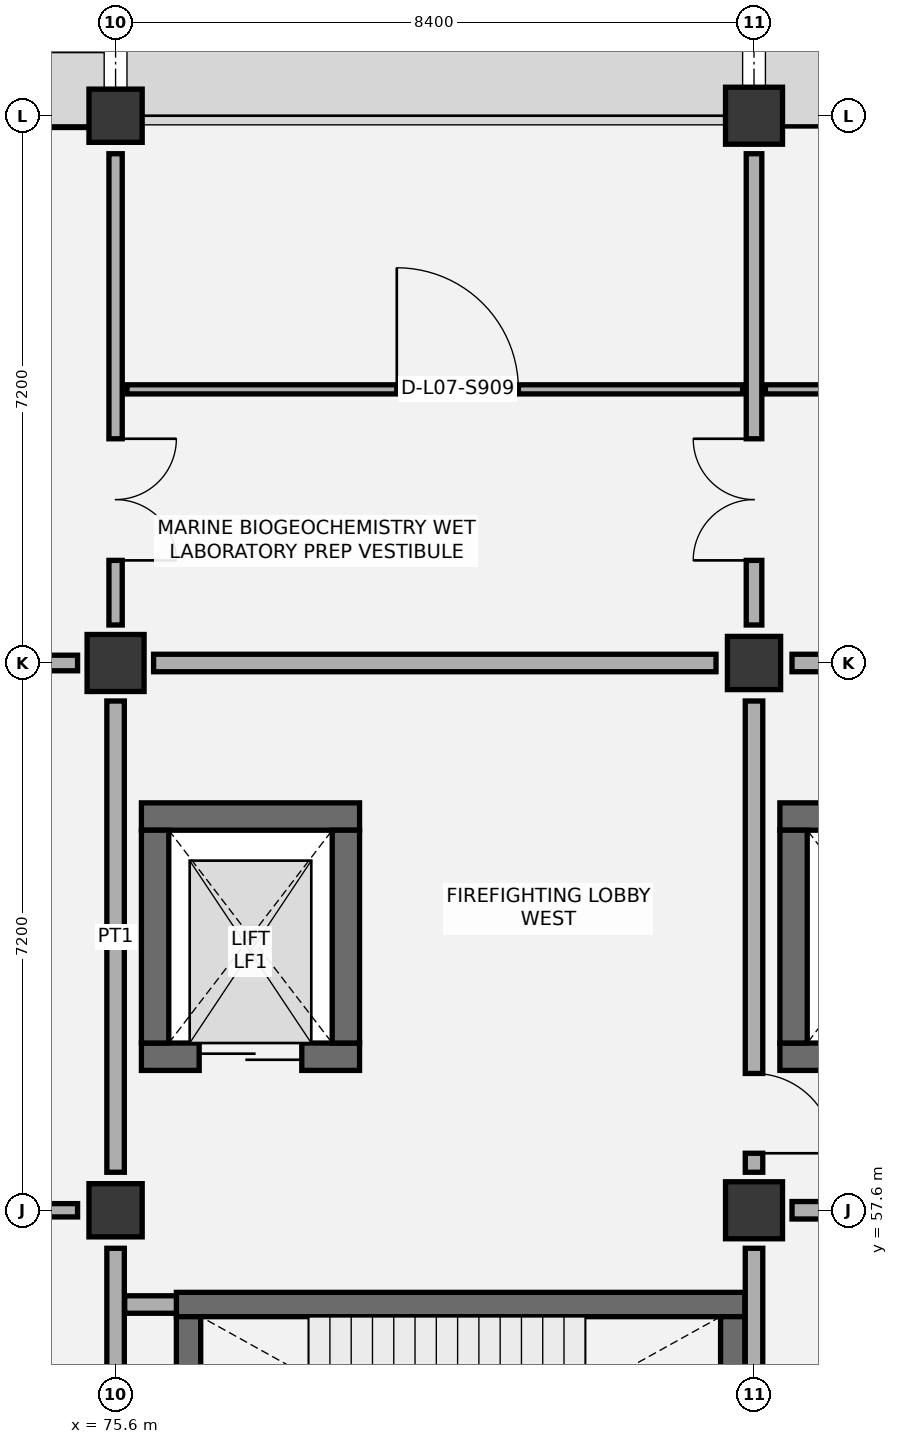
"""IFC4 building model, lengths in metres.
Left out: names, types, materials, properties, quantities, classifications, styles, units other than length and angle.
Written with IfcOpenShell. Run it as: python <this file> out.ifc"""

import sys

from ifc_helpers import new_model, si_unit, direction, frame, frame_2d, origin, origin_2d, place, context, subcontext, project, spatial, rectangle, extrude, element, fill, save


model = new_model("IFC4")
c1 = context("Model", 3, precision=1e-05, world=origin(), true_north=direction((0.0, 1.0)))
c2 = subcontext(c1, "Body", "Model", "MODEL_VIEW")
j1 = project(units=[si_unit("LENGTHUNIT", "METRE"), si_unit("PLANEANGLEUNIT", "RADIAN")], contexts=[c1])
p1 = place(None, origin())
s1 = spatial("IfcSite", under=j1, at=p1, CompositionType="ELEMENT")
p2 = place(p1, origin())
s2 = spatial("IfcBuilding", under=s1, at=p2, CompositionType="ELEMENT")
p3 = place(p2, frame((0.0, 0.0, 35.4)))
s3 = spatial("IfcBuildingStorey", under=s2, at=p3, CompositionType="ELEMENT", Elevation=35.4)
p4 = place(p3, frame((75.6, 57.6, 0.0), z_axis=(0.0, 0.0, 1.0), x_axis=(1.0, 0.0, 0.0)))
e1 = element("IfcColumn", 1, at=p4, inside=s3, PredefinedType="COLUMN", context=c2, shape_type="SweptSolid", body=[
    extrude(rectangle(XDim=0.7, YDim=0.7, at=origin_2d()), origin(), (0.0, 0.0, 1.0), 4.2),
])
p5 = place(p3, frame((75.6, 64.8, 0.0), z_axis=(0.0, 0.0, 1.0), x_axis=(1.0, 0.0, 0.0)))
e2 = element("IfcColumn", 2, at=p5, inside=s3, PredefinedType="COLUMN", context=c2, shape_type="SweptSolid", body=[
    extrude(rectangle(XDim=0.75, YDim=0.75, at=origin_2d()), origin(), (0.0, 0.0, 1.0), 4.2),
])
p6 = place(p3, frame((75.6, 72.0, 0.0), z_axis=(0.0, 0.0, 1.0), x_axis=(1.0, 0.0, 0.0)))
e3 = element("IfcColumn", 3, at=p6, inside=s3, PredefinedType="COLUMN", context=c2, shape_type="SweptSolid", body=[
    extrude(rectangle(XDim=0.7, YDim=0.7, at=origin_2d()), origin(), (0.0, 0.0, 1.0), 4.2),
])
p7 = place(p3, frame((84.0, 57.6, 0.0), z_axis=(0.0, 0.0, 1.0), x_axis=(1.0, 0.0, 0.0)))
e4 = element("IfcColumn", 4, at=p7, inside=s3, PredefinedType="COLUMN", context=c2, shape_type="SweptSolid", body=[
    extrude(rectangle(XDim=0.75, YDim=0.75, at=origin_2d()), origin(), (0.0, 0.0, 1.0), 4.2),
])
p8 = place(p3, frame((84.0, 64.8, 0.0), z_axis=(0.0, 0.0, 1.0), x_axis=(1.0, 0.0, 0.0)))
e5 = element("IfcColumn", 5, at=p8, inside=s3, PredefinedType="COLUMN", context=c2, shape_type="SweptSolid", body=[
    extrude(rectangle(XDim=0.7, YDim=0.7, at=origin_2d()), origin(), (0.0, 0.0, 1.0), 4.2),
])
p9 = place(p3, frame((84.0, 72.0, 0.0), z_axis=(0.0, 0.0, 1.0), x_axis=(1.0, 0.0, 0.0)))
e6 = element("IfcColumn", 6, at=p9, inside=s3, PredefinedType="COLUMN", context=c2, shape_type="SweptSolid", body=[
    extrude(rectangle(XDim=0.75, YDim=0.75, at=origin_2d()), origin(), (0.0, 0.0, 1.0), 4.2),
])
p10 = place(p3, frame((76.4, 56.36, 0.0), z_axis=(0.0, 0.0, 1.0), x_axis=(1.0, 0.0, 0.0)))
e7 = element("IfcWall", 7, at=p10, inside=s3, PredefinedType="SHEAR", context=c2, shape_type="SweptSolid", body=[
    extrude(rectangle(XDim=7.48, YDim=0.32, at=frame_2d((3.74, 0.0))), origin(), (0.0, 0.0, 1.0), 3.92),
])
for number, where, z_axis, x_axis in (
    (8, (76.56, 52.4, 0.0), (0.0, 0.0, 1.0), (0.0, 1.0, 0.0)),
    (9, (83.72, 52.4, 0.0), (0.0, 0.0, 1.0), (0.0, 1.0, 0.0)),
):
    element("IfcWall", number, at=place(p3, frame(where, z_axis=z_axis, x_axis=x_axis)), inside=s3, PredefinedType="SHEAR", context=c2, shape_type="SweptSolid", body=[
        extrude(rectangle(XDim=3.8, YDim=0.32, at=frame_2d((1.9, 0.0))), origin(), (0.0, 0.0, 1.0), 3.92),
    ])
p11 = place(p3, frame((75.94, 62.78, 0.0), z_axis=(0.0, 0.0, 1.0), x_axis=(1.0, 0.0, 0.0)))
e10 = element("IfcWall", 10, at=p11, inside=s3, PredefinedType="SHEAR", context=c2, shape_type="SweptSolid", body=[
    extrude(rectangle(XDim=2.87, YDim=0.36, at=frame_2d((1.435, 0.0))), origin(), (0.0, 0.0, 1.0), 3.92),
])
p12 = place(p3, frame((75.94, 59.62, 0.0), z_axis=(0.0, 0.0, 1.0), x_axis=(1.0, 0.0, 0.0)))
e11 = element("IfcWall", 11, at=p12, inside=s3, PredefinedType="SHEAR", context=c2, shape_type="SweptSolid", body=[
    extrude(rectangle(XDim=2.87, YDim=0.36, at=frame_2d((1.435, 0.0))), origin(), (0.0, 0.0, 1.0), 3.92),
])
p13 = place(p12, frame((0.76, 0.0, 0.0)))
e12 = element("IfcOpeningElement", 12, at=p13, cuts=e11, PredefinedType="OPENING", context=c2, shape_type="SweptSolid", body=[
    extrude(rectangle(XDim=1.35, YDim=2.2, at=frame_2d((0.675, 1.1))), frame((0.0, 0.19, 0.0), z_axis=(0.0, -1.0, 0.0), x_axis=(1.0, 0.0, 0.0)), (0.0, 0.0, 1.0), 0.38),
])
for number, where, z_axis, x_axis in (
    (13, (76.12, 59.8, 0.0), (0.0, 0.0, 1.0), (0.0, 1.0, 0.0)),
    (14, (78.63, 59.8, 0.0), (0.0, 0.0, 1.0), (0.0, 1.0, 0.0)),
):
    element("IfcWall", number, at=place(p3, frame(where, z_axis=z_axis, x_axis=x_axis)), inside=s3, PredefinedType="SHEAR", context=c2, shape_type="SweptSolid", body=[
        extrude(rectangle(XDim=2.8, YDim=0.36, at=frame_2d((1.4, 0.0))), origin(), (0.0, 0.0, 1.0), 3.92),
    ])
p14 = place(p3, frame((84.34, 62.78, 0.0), z_axis=(0.0, 0.0, 1.0), x_axis=(1.0, 0.0, 0.0)))
e15 = element("IfcWall", 15, at=p14, inside=s3, PredefinedType="SHEAR", context=c2, shape_type="SweptSolid", body=[
    extrude(rectangle(XDim=7.77, YDim=0.36, at=frame_2d((3.885, 0.0))), origin(), (0.0, 0.0, 1.0), 3.92),
])
p15 = place(p3, frame((84.34, 59.62, 0.0), z_axis=(0.0, 0.0, 1.0), x_axis=(1.0, 0.0, 0.0)))
e16 = element("IfcWall", 16, at=p15, inside=s3, PredefinedType="SHEAR", context=c2, shape_type="SweptSolid", body=[
    extrude(rectangle(XDim=2.66, YDim=0.36, at=frame_2d((1.33, 0.0))), origin(), (0.0, 0.0, 1.0), 3.92),
])
p16 = place(p15, frame((0.78, 0.0, 0.0)))
e17 = element("IfcOpeningElement", 17, at=p16, cuts=e16, PredefinedType="OPENING", context=c2, shape_type="SweptSolid", body=[
    extrude(rectangle(XDim=1.1, YDim=2.15, at=frame_2d((0.55, 1.075))), frame((0.0, 0.19, 0.0), z_axis=(0.0, -1.0, 0.0), x_axis=(1.0, 0.0, 0.0)), (0.0, 0.0, 1.0), 0.38),
])
p17 = place(p3, frame((84.52, 59.8, 0.0), z_axis=(0.0, 0.0, 1.0), x_axis=(0.0, 1.0, 0.0)))
e18 = element("IfcWall", 18, at=p17, inside=s3, PredefinedType="SHEAR", context=c2, shape_type="SweptSolid", body=[
    extrude(rectangle(XDim=2.8, YDim=0.36, at=frame_2d((1.4, 0.0))), origin(), (0.0, 0.0, 1.0), 3.92),
])
p18 = place(p3, frame((67.575, 72.0, 0.0), z_axis=(0.0, 0.0, 1.0), x_axis=(1.0, 0.0, 0.0)))
e19 = element("IfcWall", 19, at=p18, inside=s3, PredefinedType="SOLIDWALL", context=c2, shape_type="SweptSolid", body=[
    extrude(rectangle(XDim=7.675, YDim=0.31, at=frame_2d((3.837, 0.0))), origin(), (0.0, 0.0, 1.0), 3.365),
])
p19 = place(p18, frame((1.058, 0.0, 0.9)))
e20 = element("IfcOpeningElement", 20, at=p19, cuts=e19, PredefinedType="OPENING", context=c2, shape_type="SweptSolid", body=[
    extrude(rectangle(XDim=2.25, YDim=1.95, at=frame_2d((1.125, 0.975))), frame((0.0, 0.165, 0.0), z_axis=(0.0, -1.0, 0.0), x_axis=(1.0, 0.0, 0.0)), (0.0, 0.0, 1.0), 0.33),
])
p20 = place(p18, frame((4.367, 0.0, 0.9)))
e21 = element("IfcOpeningElement", 21, at=p20, cuts=e19, PredefinedType="OPENING", context=c2, shape_type="SweptSolid", body=[
    extrude(rectangle(XDim=2.25, YDim=1.95, at=frame_2d((1.125, 0.975))), frame((0.0, 0.165, 0.0), z_axis=(0.0, -1.0, 0.0), x_axis=(1.0, 0.0, 0.0)), (0.0, 0.0, 1.0), 0.33),
])
p21 = place(p3, frame((84.375, 72.0, 0.0), z_axis=(0.0, 0.0, 1.0), x_axis=(1.0, 0.0, 0.0)))
e22 = element("IfcWall", 22, at=p21, inside=s3, PredefinedType="SOLIDWALL", context=c2, shape_type="SweptSolid", body=[
    extrude(rectangle(XDim=7.675, YDim=0.27, at=frame_2d((3.837, 0.0))), origin(), (0.0, 0.0, 1.0), 3.365),
])
p22 = place(p21, frame((1.758, 0.0, 0.9)))
e23 = element("IfcOpeningElement", 23, at=p22, cuts=e22, PredefinedType="OPENING", context=c2, shape_type="SweptSolid", body=[
    extrude(rectangle(XDim=1.2, YDim=1.8, at=frame_2d((0.6, 0.9))), frame((0.0, 0.145, 0.0), z_axis=(0.0, -1.0, 0.0), x_axis=(1.0, 0.0, 0.0)), (0.0, 0.0, 1.0), 0.29),
])
p23 = place(p21, frame((4.717, 0.0, 0.9)))
e24 = element("IfcOpeningElement", 24, at=p23, cuts=e22, PredefinedType="OPENING", context=c2, shape_type="SweptSolid", body=[
    extrude(rectangle(XDim=1.2, YDim=1.8, at=frame_2d((0.6, 0.9))), frame((0.0, 0.145, 0.0), z_axis=(0.0, -1.0, 0.0), x_axis=(1.0, 0.0, 0.0)), (0.0, 0.0, 1.0), 0.29),
])
p24 = place(p3, frame((75.75, 68.4, 0.0), z_axis=(0.0, 0.0, 1.0), x_axis=(1.0, 0.0, 0.0)))
e25 = element("IfcWall", 25, at=p24, inside=s3, PredefinedType="PARTITIONING", context=c2, shape_type="SweptSolid", body=[
    extrude(rectangle(XDim=8.1, YDim=0.12, at=frame_2d((4.05, 0.0))), origin(), (0.0, 0.0, 1.0), 3.92),
])
p25 = place(p24, frame((3.55, 0.0, 0.0)))
e26 = element("IfcOpeningElement", 26, at=p25, cuts=e25, PredefinedType="OPENING", context=c2, shape_type="SweptSolid", body=[
    extrude(rectangle(XDim=1.6, YDim=2.2, at=frame_2d((0.8, 1.1))), frame((0.0, 0.07, 0.0), z_axis=(0.0, -1.0, 0.0), x_axis=(1.0, 0.0, 0.0)), (0.0, 0.0, 1.0), 0.14),
])
p26 = place(p3, frame((84.15, 68.4, 0.0), z_axis=(0.0, 0.0, 1.0), x_axis=(1.0, 0.0, 0.0)))
e27 = element("IfcWall", 27, at=p26, inside=s3, PredefinedType="PARTITIONING", context=c2, shape_type="SweptSolid", body=[
    extrude(rectangle(XDim=8.1, YDim=0.12, at=frame_2d((4.05, 0.0))), origin(), (0.0, 0.0, 1.0), 3.92),
])
p27 = place(p26, frame((3.55, 0.0, 0.0)))
e28 = element("IfcOpeningElement", 28, at=p27, cuts=e27, PredefinedType="OPENING", context=c2, shape_type="SweptSolid", body=[
    extrude(rectangle(XDim=1.6, YDim=2.2, at=frame_2d((0.8, 1.1))), frame((0.0, 0.07, 0.0), z_axis=(0.0, -1.0, 0.0), x_axis=(1.0, 0.0, 0.0)), (0.0, 0.0, 1.0), 0.14),
])
p28 = place(p3, frame((75.6, 50.9, 0.0), z_axis=(0.0, 0.0, 1.0), x_axis=(0.0, 1.0, 0.0)))
e29 = element("IfcWall", 29, at=p28, inside=s3, PredefinedType="PARTITIONING", context=c2, shape_type="SweptSolid", body=[
    extrude(rectangle(XDim=6.2, YDim=0.23, at=frame_2d((3.1, 0.0))), origin(), (0.0, 0.0, 1.0), 3.315),
])
p29 = place(p28, frame((0.05, 0.0, 0.0)))
e30 = element("IfcOpeningElement", 30, at=p29, cuts=e29, PredefinedType="OPENING", context=c2, shape_type="SweptSolid", body=[
    extrude(rectangle(XDim=1.05, YDim=2.15, at=frame_2d((0.525, 1.075))), frame((0.0, 0.125, 0.0), z_axis=(0.0, -1.0, 0.0), x_axis=(1.0, 0.0, 0.0)), (0.0, 0.0, 1.0), 0.25),
])
p30 = place(p3, frame((67.7, 57.6, 0.0), z_axis=(0.0, 0.0, 1.0), x_axis=(1.0, 0.0, 0.0)))
e31 = element("IfcWall", 31, at=p30, inside=s3, PredefinedType="PARTITIONING", context=c2, shape_type="SweptSolid", body=[
    extrude(rectangle(XDim=7.4, YDim=0.175, at=frame_2d((3.7, 0.0))), origin(), (0.0, 0.0, 1.0), 3.265),
])
p31 = place(p30, frame((3.05, 0.0, 0.0)))
e32 = element("IfcOpeningElement", 32, at=p31, cuts=e31, PredefinedType="OPENING", context=c2, shape_type="SweptSolid", body=[
    extrude(rectangle(XDim=1.3, YDim=2.15, at=frame_2d((0.65, 1.075))), frame((0.0, 0.097, 0.0), z_axis=(0.0, -1.0, 0.0), x_axis=(1.0, 0.0, 0.0)), (0.0, 0.0, 1.0), 0.195),
])
p32 = place(p3, frame((75.6, 58.1, 0.0), z_axis=(0.0, 0.0, 1.0), x_axis=(0.0, 1.0, 0.0)))
e33 = element("IfcWall", 33, at=p32, inside=s3, PredefinedType="PARTITIONING", context=c2, shape_type="SweptSolid", body=[
    extrude(rectangle(XDim=6.2, YDim=0.23, at=frame_2d((3.1, 0.0))), origin(), (0.0, 0.0, 1.0), 3.515),
])
p33 = place(p3, frame((67.7, 64.8, 0.0), z_axis=(0.0, 0.0, 1.0), x_axis=(1.0, 0.0, 0.0)))
e34 = element("IfcWall", 34, at=p33, inside=s3, PredefinedType="PARTITIONING", context=c2, shape_type="SweptSolid", body=[
    extrude(rectangle(XDim=7.4, YDim=0.205, at=frame_2d((3.7, 0.0))), origin(), (0.0, 0.0, 1.0), 3.265),
])
p34 = place(p33, frame((2.975, 0.0, 0.0)))
e35 = element("IfcOpeningElement", 35, at=p34, cuts=e34, PredefinedType="OPENING", context=c2, shape_type="SweptSolid", body=[
    extrude(rectangle(XDim=1.45, YDim=2.2, at=frame_2d((0.725, 1.1))), frame((0.0, 0.113, 0.0), z_axis=(0.0, -1.0, 0.0), x_axis=(1.0, 0.0, 0.0)), (0.0, 0.0, 1.0), 0.225),
])
p35 = place(p3, frame((75.6, 65.3, 0.0), z_axis=(0.0, 0.0, 1.0), x_axis=(0.0, 1.0, 0.0)))
e36 = element("IfcWall", 36, at=p35, inside=s3, PredefinedType="PARTITIONING", context=c2, shape_type="SweptSolid", body=[
    extrude(rectangle(XDim=6.2, YDim=0.175, at=frame_2d((3.1, 0.0))), origin(), (0.0, 0.0, 1.0), 3.315),
])
p36 = place(p35, frame((0.85, 0.0, 0.0)))
e37 = element("IfcOpeningElement", 37, at=p36, cuts=e36, PredefinedType="OPENING", context=c2, shape_type="SweptSolid", body=[
    extrude(rectangle(XDim=1.6, YDim=2.2, at=frame_2d((0.8, 1.1))), frame((0.0, 0.097, 0.0), z_axis=(0.0, -1.0, 0.0), x_axis=(1.0, 0.0, 0.0)), (0.0, 0.0, 1.0), 0.195),
])
p37 = place(p3, frame((84.0, 50.9, 0.0), z_axis=(0.0, 0.0, 1.0), x_axis=(0.0, 1.0, 0.0)))
e38 = element("IfcWall", 38, at=p37, inside=s3, PredefinedType="PARTITIONING", context=c2, shape_type="SweptSolid", body=[
    extrude(rectangle(XDim=6.2, YDim=0.23, at=frame_2d((3.1, 0.0))), origin(), (0.0, 0.0, 1.0), 3.515),
])
p38 = place(p37, frame((0.05, 0.0, 0.0)))
e39 = element("IfcOpeningElement", 39, at=p38, cuts=e38, PredefinedType="OPENING", context=c2, shape_type="SweptSolid", body=[
    extrude(rectangle(XDim=1.05, YDim=2.15, at=frame_2d((0.525, 1.075))), frame((0.0, 0.125, 0.0), z_axis=(0.0, -1.0, 0.0), x_axis=(1.0, 0.0, 0.0)), (0.0, 0.0, 1.0), 0.25),
])
p39 = place(p3, frame((75.72, 56.36, 0.0), z_axis=(0.0, 0.0, 1.0), x_axis=(1.0, 0.0, 0.0)))
e40 = element("IfcWall", 40, at=p39, inside=s3, PredefinedType="PARTITIONING", context=c2, shape_type="SweptSolid", body=[
    extrude(rectangle(XDim=0.68, YDim=0.23, at=frame_2d((0.34, 0.0))), origin(), (0.0, 0.0, 1.0), 3.92),
])
p40 = place(p3, frame((84.0, 58.1, 0.0), z_axis=(0.0, 0.0, 1.0), x_axis=(0.0, 1.0, 0.0)))
e41 = element("IfcWall", 41, at=p40, inside=s3, PredefinedType="PARTITIONING", context=c2, shape_type="SweptSolid", body=[
    extrude(rectangle(XDim=6.2, YDim=0.23, at=frame_2d((3.1, 0.0))), origin(), (0.0, 0.0, 1.0), 3.315),
])
p41 = place(p40, frame((0.25, 0.0, 0.0)))
e42 = element("IfcOpeningElement", 42, at=p41, cuts=e41, PredefinedType="OPENING", context=c2, shape_type="SweptSolid", body=[
    extrude(rectangle(XDim=1.05, YDim=2.15, at=frame_2d((0.525, 1.075))), frame((0.0, 0.125, 0.0), z_axis=(0.0, -1.0, 0.0), x_axis=(1.0, 0.0, 0.0)), (0.0, 0.0, 1.0), 0.25),
])
p42 = place(p3, frame((76.1, 64.8, 0.0), z_axis=(0.0, 0.0, 1.0), x_axis=(1.0, 0.0, 0.0)))
e43 = element("IfcWall", 43, at=p42, inside=s3, PredefinedType="PARTITIONING", context=c2, shape_type="SweptSolid", body=[
    extrude(rectangle(XDim=7.4, YDim=0.23, at=frame_2d((3.7, 0.0))), origin(), (0.0, 0.0, 1.0), 3.565),
])
p43 = place(p3, frame((84.0, 65.3, 0.0), z_axis=(0.0, 0.0, 1.0), x_axis=(0.0, 1.0, 0.0)))
e44 = element("IfcWall", 44, at=p43, inside=s3, PredefinedType="PARTITIONING", context=c2, shape_type="SweptSolid", body=[
    extrude(rectangle(XDim=6.2, YDim=0.205, at=frame_2d((3.1, 0.0))), origin(), (0.0, 0.0, 1.0), 3.625),
])
p44 = place(p43, frame((0.85, 0.0, 0.0)))
e45 = element("IfcOpeningElement", 45, at=p44, cuts=e44, PredefinedType="OPENING", context=c2, shape_type="SweptSolid", body=[
    extrude(rectangle(XDim=1.6, YDim=2.2, at=frame_2d((0.8, 1.1))), frame((0.0, 0.113, 0.0), z_axis=(0.0, -1.0, 0.0), x_axis=(1.0, 0.0, 0.0)), (0.0, 0.0, 1.0), 0.225),
])
p45 = place(p3, frame((84.5, 57.6, 0.0), z_axis=(0.0, 0.0, 1.0), x_axis=(1.0, 0.0, 0.0)))
e46 = element("IfcWall", 46, at=p45, inside=s3, PredefinedType="PARTITIONING", context=c2, shape_type="SweptSolid", body=[
    extrude(rectangle(XDim=7.4, YDim=0.23, at=frame_2d((3.7, 0.0))), origin(), (0.0, 0.0, 1.0), 3.625),
])
p46 = place(p45, frame((2.95, 0.0, 0.0)))
e47 = element("IfcOpeningElement", 47, at=p46, cuts=e46, PredefinedType="OPENING", context=c2, shape_type="SweptSolid", body=[
    extrude(rectangle(XDim=1.5, YDim=2.15, at=frame_2d((0.75, 1.075))), frame((0.0, 0.125, 0.0), z_axis=(0.0, -1.0, 0.0), x_axis=(1.0, 0.0, 0.0)), (0.0, 0.0, 1.0), 0.25),
])
p47 = place(p3, frame((84.5, 64.8, 0.0), z_axis=(0.0, 0.0, 1.0), x_axis=(1.0, 0.0, 0.0)))
e48 = element("IfcWall", 48, at=p47, inside=s3, PredefinedType="PARTITIONING", context=c2, shape_type="SweptSolid", body=[
    extrude(rectangle(XDim=7.4, YDim=0.23, at=frame_2d((3.7, 0.0))), origin(), (0.0, 0.0, 1.0), 3.625),
])
p48 = place(p13, origin())
e49 = element("IfcDoor", 49, at=p48, inside=s3, OperationType="DOUBLE_DOOR_SLIDING", PredefinedType="DOOR", context=c2, shape_type="SweptSolid", body=[
    extrude(rectangle(XDim=1.35, YDim=2.2, at=frame_2d((0.675, 1.1))), frame((0.0, 0.025, 0.0), z_axis=(0.0, -1.0, 0.0), x_axis=(1.0, 0.0, 0.0)), (0.0, 0.0, 1.0), 0.05),
])
fill(e12, e49)
p49 = place(p25, origin())
e50 = element("IfcDoor", 50, at=p49, inside=s3, OperationType="SINGLE_SWING_LEFT", PredefinedType="DOOR", context=c2, shape_type="SweptSolid", body=[
    extrude(rectangle(XDim=1.6, YDim=2.2, at=frame_2d((0.8, 1.1))), frame((0.0, 0.025, 0.0), z_axis=(0.0, -1.0, 0.0), x_axis=(1.0, 0.0, 0.0)), (0.0, 0.0, 1.0), 0.05),
])
fill(e26, e50)
p50 = place(p36, frame((1.6, 0.0, 0.0), z_axis=(0.0, 0.0, 1.0), x_axis=(-1.0, 0.0, 0.0)))
e51 = element("IfcDoor", 51, at=p50, inside=s3, OperationType="DOUBLE_DOOR_SINGLE_SWING", PredefinedType="DOOR", context=c2, shape_type="SweptSolid", body=[
    extrude(rectangle(XDim=1.6, YDim=2.2, at=frame_2d((0.8, 1.1))), frame((0.0, 0.025, 0.0), z_axis=(0.0, -1.0, 0.0), x_axis=(1.0, 0.0, 0.0)), (0.0, 0.0, 1.0), 0.05),
])
fill(e37, e51)
p51 = place(p41, frame((1.05, 0.0, 0.0), z_axis=(0.0, 0.0, 1.0), x_axis=(-1.0, 0.0, 0.0)))
e52 = element("IfcDoor", 52, at=p51, inside=s3, OperationType="SINGLE_SWING_RIGHT", PredefinedType="DOOR", context=c2, shape_type="SweptSolid", body=[
    extrude(rectangle(XDim=1.05, YDim=2.15, at=frame_2d((0.525, 1.075))), frame((0.0, 0.025, 0.0), z_axis=(0.0, -1.0, 0.0), x_axis=(1.0, 0.0, 0.0)), (0.0, 0.0, 1.0), 0.05),
])
fill(e42, e52)
p52 = place(p44, origin())
e53 = element("IfcDoor", 53, at=p52, inside=s3, OperationType="DOUBLE_DOOR_SINGLE_SWING", PredefinedType="DOOR", context=c2, shape_type="SweptSolid", body=[
    extrude(rectangle(XDim=1.6, YDim=2.2, at=frame_2d((0.8, 1.1))), frame((0.0, 0.025, 0.0), z_axis=(0.0, -1.0, 0.0), x_axis=(1.0, 0.0, 0.0)), (0.0, 0.0, 1.0), 0.05),
])
fill(e45, e53)
save(model, sys.argv[1])
